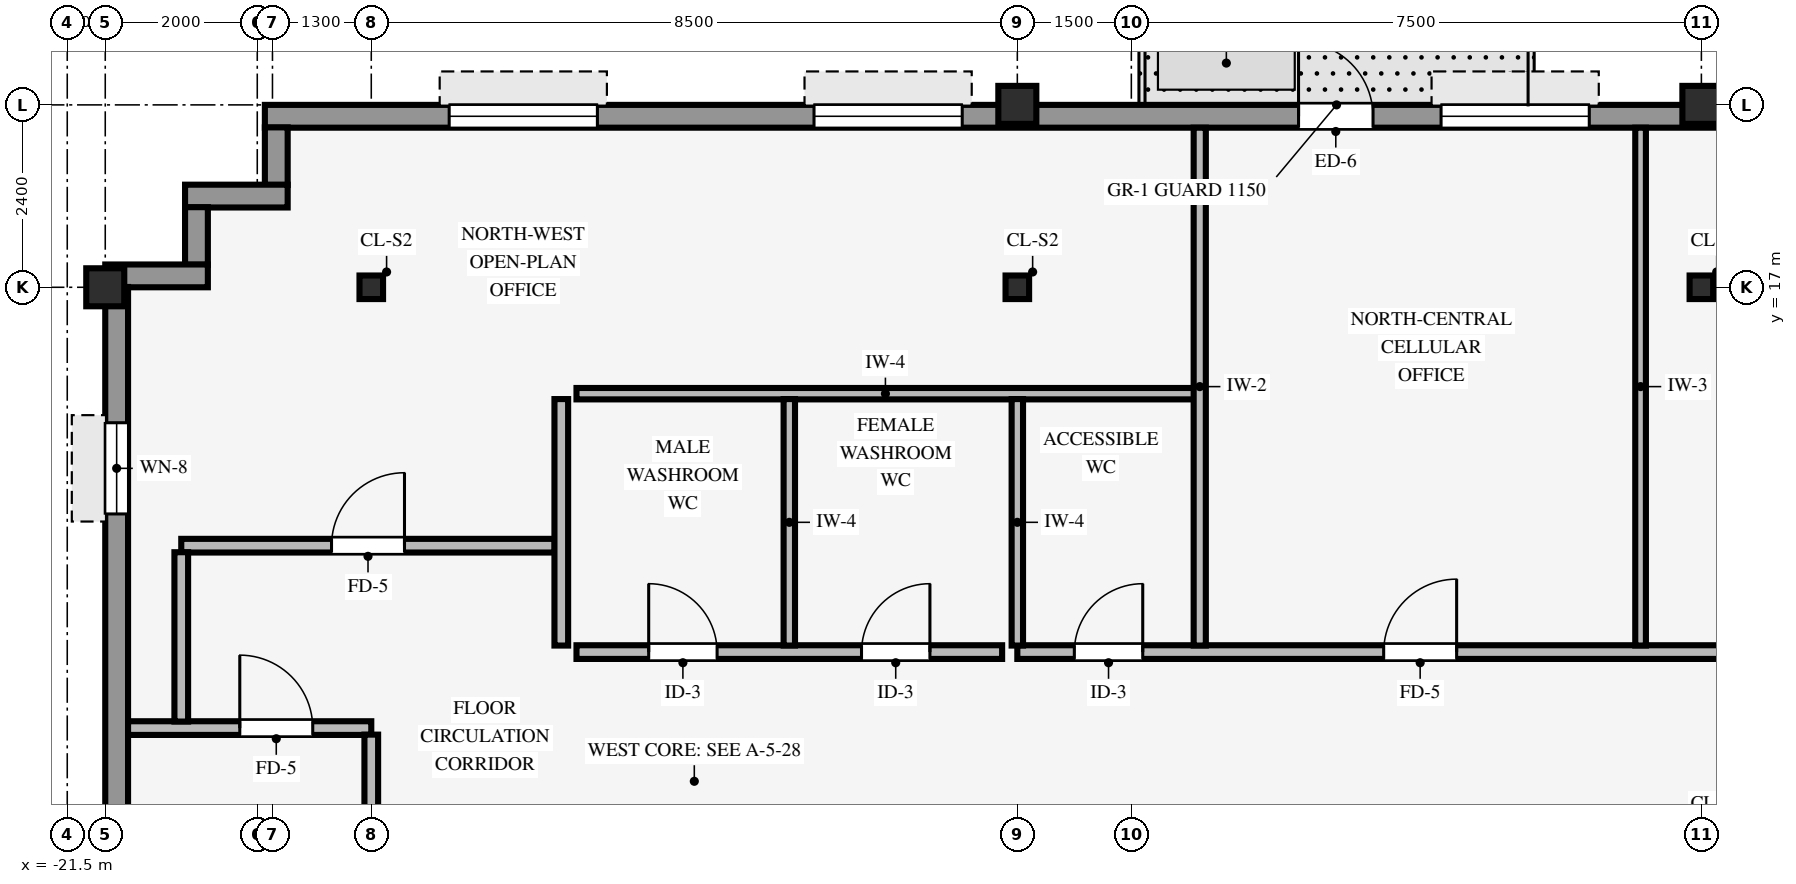
"""IFC4 building model, lengths in metres.
Left out: names, types, materials, properties, quantities, classifications, styles, units other than length and angle.
Written with IfcOpenShell. Run it as: python <this file> out.ifc"""

import sys

from ifc_helpers import new_model, si_unit, direction, frame, frame_2d, origin, origin_2d, place, context, subcontext, project, spatial, rectangle, hollow_rectangle, i_section, extrude, source, transform, mapped, element, fill, save


model = new_model("IFC4")
c1 = context("Model", 3, precision=1e-05, world=origin(), true_north=direction((0.0, 1.0)))
c2 = subcontext(c1, "Body", "Model", "MODEL_VIEW")
j1 = project(units=[si_unit("LENGTHUNIT", "METRE"), si_unit("PLANEANGLEUNIT", "RADIAN")], contexts=[c1])
p1 = place(None, origin())
s1 = spatial("IfcSite", under=j1, at=p1, CompositionType="ELEMENT")
p2 = place(p1, origin())
s2 = spatial("IfcBuilding", under=s1, at=p2, CompositionType="ELEMENT")
p3 = place(p2, frame((0.0, 0.0, 265.25)))
s3 = spatial("IfcBuildingStorey", under=s2, at=p3, CompositionType="ELEMENT", Elevation=265.25)
for number, where, z_axis, x_axis in (
    (1, (-21.0, 17.0, 0.0), (0.0, 0.0, 1.0), (1.0, 0.0, 0.0)),
    (2, (-9.0, 19.4, 0.0), (0.0, 0.0, 1.0), (1.0, 0.0, 0.0)),
    (3, (0.0, 19.4, 0.0), (0.0, 0.0, 1.0), (1.0, 0.0, 0.0)),
):
    element("IfcColumn", number, at=place(p3, frame(where, z_axis=z_axis, x_axis=x_axis)), inside=s3, PredefinedType="COLUMN", context=c2, shape_type="SweptSolid", body=[
        extrude(hollow_rectangle(XDim=0.5, YDim=0.5, WallThickness=0.032, InnerFilletRadius=0.032, OuterFilletRadius=0.064, at=origin_2d()), origin(), (0.0, 0.0, 1.0), 3.37),
    ])
for number, where, z_axis, x_axis in (
    (4, (0.0, 17.0, 0.0), (0.0, 0.0, 1.0), (1.0, 0.0, 0.0)),
    (5, (-17.5, 17.0, 0.0), (0.0, 0.0, 1.0), (1.0, 0.0, 0.0)),
    (6, (-9.0, 17.0, 0.0), (0.0, 0.0, 1.0), (1.0, 0.0, 0.0)),
):
    element("IfcColumn", number, at=place(p3, frame(where, z_axis=z_axis, x_axis=x_axis)), inside=s3, PredefinedType="COLUMN", context=c2, shape_type="SweptSolid", body=[
        extrude(i_section(OverallWidth=0.31, OverallDepth=0.31, WebThickness=0.015, FlangeThickness=0.015, FilletRadius=0.015, at=origin_2d()), origin(), (0.0, 0.0, 1.0), 3.37),
    ])
p4 = place(p3, frame((-18.9, 19.25, 0.0), z_axis=(0.0, 0.0, 1.0), x_axis=(1.0, 0.0, 0.0)))
e7 = element("IfcWall", 7, at=p4, inside=s3, PredefinedType="STANDARD", context=c2, shape_type="SweptSolid", body=[
    extrude(rectangle(XDim=35.6, YDim=0.3, at=frame_2d((17.8, 0.0))), origin(), (0.0, 0.0, 1.0), 2.705),
])
p5 = place(p4, frame((13.6, 0.0, 0.0)))
e8 = element("IfcOpeningElement", 8, at=p5, cuts=e7, PredefinedType="OPENING", context=c2, shape_type="SweptSolid", body=[
    extrude(rectangle(XDim=0.98, YDim=2.15, at=frame_2d((0.49, 1.075))), frame((0.0, 0.16, 0.0), z_axis=(0.0, -1.0, 0.0), x_axis=(1.0, 0.0, 0.0)), (0.0, 0.0, 1.0), 0.32),
])
p6 = place(p4, frame((2.425, 0.0, 0.8)))
e9 = element("IfcOpeningElement", 9, at=p6, cuts=e7, PredefinedType="OPENING", context=c2, shape_type="SweptSolid", body=[
    extrude(rectangle(XDim=1.95, YDim=1.48, at=frame_2d((0.975, 0.74))), frame((0.0, 0.16, 0.0), z_axis=(0.0, -1.0, 0.0), x_axis=(1.0, 0.0, 0.0)), (0.0, 0.0, 1.0), 0.32),
])
p7 = place(p4, frame((7.225, 0.0, 0.8)))
e10 = element("IfcOpeningElement", 10, at=p7, cuts=e7, PredefinedType="OPENING", context=c2, shape_type="SweptSolid", body=[
    extrude(rectangle(XDim=1.95, YDim=1.48, at=frame_2d((0.975, 0.74))), frame((0.0, 0.16, 0.0), z_axis=(0.0, -1.0, 0.0), x_axis=(1.0, 0.0, 0.0)), (0.0, 0.0, 1.0), 0.32),
])
p8 = place(p4, frame((15.475, 0.0, 0.8)))
e11 = element("IfcOpeningElement", 11, at=p8, cuts=e7, PredefinedType="OPENING", context=c2, shape_type="SweptSolid", body=[
    extrude(rectangle(XDim=1.95, YDim=1.48, at=frame_2d((0.975, 0.74))), frame((0.0, 0.16, 0.0), z_axis=(0.0, -1.0, 0.0), x_axis=(1.0, 0.0, 0.0)), (0.0, 0.0, 1.0), 0.32),
])
p9 = place(p4, frame((21.625, 0.0, 0.8)))
e12 = element("IfcOpeningElement", 12, at=p9, cuts=e7, PredefinedType="OPENING", context=c2, shape_type="SweptSolid", body=[
    extrude(rectangle(XDim=1.95, YDim=1.48, at=frame_2d((0.975, 0.74))), frame((0.0, 0.16, 0.0), z_axis=(0.0, -1.0, 0.0), x_axis=(1.0, 0.0, 0.0)), (0.0, 0.0, 1.0), 0.32),
])
p10 = place(p4, frame((32.575, 0.0, 0.8)))
e13 = element("IfcOpeningElement", 13, at=p10, cuts=e7, PredefinedType="OPENING", context=c2, shape_type="SweptSolid", body=[
    extrude(rectangle(XDim=1.95, YDim=1.48, at=frame_2d((0.975, 0.74))), frame((0.0, 0.16, 0.0), z_axis=(0.0, -1.0, 0.0), x_axis=(1.0, 0.0, 0.0)), (0.0, 0.0, 1.0), 0.32),
])
p11 = place(p3, frame((-18.75, 18.346, 0.0), z_axis=(0.0, 0.0, 1.0), x_axis=(0.0, 1.0, 0.0)))
e14 = element("IfcWall", 14, at=p11, inside=s3, PredefinedType="STANDARD", context=c2, shape_type="SweptSolid", body=[
    extrude(rectangle(XDim=0.758, YDim=0.3, at=frame_2d((0.379, 0.0))), origin(), (0.0, 0.0, 1.0), 2.892),
])
p12 = place(p3, frame((-19.95, 18.2, 0.0), z_axis=(0.0, 0.0, 1.0), x_axis=(1.0, 0.0, 0.0)))
e15 = element("IfcWall", 15, at=p12, inside=s3, PredefinedType="STANDARD", context=c2, shape_type="SweptSolid", body=[
    extrude(rectangle(XDim=1.35, YDim=0.3, at=frame_2d((0.675, 0.0))), origin(), (0.0, 0.0, 1.0), 2.892),
])
p13 = place(p3, frame((-19.8, 17.296, 0.0), z_axis=(0.0, 0.0, 1.0), x_axis=(0.0, 1.0, 0.0)))
e16 = element("IfcWall", 16, at=p13, inside=s3, PredefinedType="STANDARD", context=c2, shape_type="SweptSolid", body=[
    extrude(rectangle(XDim=0.758, YDim=0.3, at=frame_2d((0.379, 0.0))), origin(), (0.0, 0.0, 1.0), 2.892),
])
p14 = place(p3, frame((-21.0, 17.15, 0.0), z_axis=(0.0, 0.0, 1.0), x_axis=(1.0, 0.0, 0.0)))
e17 = element("IfcWall", 17, at=p14, inside=s3, PredefinedType="STANDARD", context=c2, shape_type="SweptSolid", body=[
    extrude(rectangle(XDim=1.35, YDim=0.3, at=frame_2d((0.675, 0.0))), origin(), (0.0, 0.0, 1.0), 2.892),
])
p15 = place(p3, frame((-20.85, -17.004, 0.0), z_axis=(0.0, 0.0, 1.0), x_axis=(0.0, 1.0, 0.0)))
e18 = element("IfcWall", 18, at=p15, inside=s3, PredefinedType="STANDARD", context=c2, shape_type="SweptSolid", body=[
    extrude(rectangle(XDim=34.008, YDim=0.3, at=frame_2d((17.004, 0.0))), origin(), (0.0, 0.0, 1.0), 2.705),
])
p16 = place(p15, frame((1.786, 0.0, 0.8)))
e19 = element("IfcOpeningElement", 19, at=p16, cuts=e18, PredefinedType="OPENING", context=c2, shape_type="SweptSolid", body=[
    extrude(rectangle(XDim=1.2, YDim=1.48, at=frame_2d((0.6, 0.74))), frame((0.0, 0.16, 0.0), z_axis=(0.0, -1.0, 0.0), x_axis=(1.0, 0.0, 0.0)), (0.0, 0.0, 1.0), 0.32),
])
p17 = place(p15, frame((8.159, 0.0, 0.8)))
e20 = element("IfcOpeningElement", 20, at=p17, cuts=e18, PredefinedType="OPENING", context=c2, shape_type="SweptSolid", body=[
    extrude(rectangle(XDim=1.2, YDim=1.48, at=frame_2d((0.6, 0.74))), frame((0.0, 0.16, 0.0), z_axis=(0.0, -1.0, 0.0), x_axis=(1.0, 0.0, 0.0)), (0.0, 0.0, 1.0), 0.32),
])
p18 = place(p15, frame((11.831, 0.0, 0.8)))
e21 = element("IfcOpeningElement", 21, at=p18, cuts=e18, PredefinedType="OPENING", context=c2, shape_type="SweptSolid", body=[
    extrude(rectangle(XDim=1.2, YDim=1.48, at=frame_2d((0.6, 0.74))), frame((0.0, 0.16, 0.0), z_axis=(0.0, -1.0, 0.0), x_axis=(1.0, 0.0, 0.0)), (0.0, 0.0, 1.0), 0.32),
])
p19 = place(p15, frame((17.754, 0.0, 0.8)))
e22 = element("IfcOpeningElement", 22, at=p19, cuts=e18, PredefinedType="OPENING", context=c2, shape_type="SweptSolid", body=[
    extrude(rectangle(XDim=1.2, YDim=1.48, at=frame_2d((0.6, 0.74))), frame((0.0, 0.16, 0.0), z_axis=(0.0, -1.0, 0.0), x_axis=(1.0, 0.0, 0.0)), (0.0, 0.0, 1.0), 0.32),
])
p20 = place(p15, frame((20.977, 0.0, 0.8)))
e23 = element("IfcOpeningElement", 23, at=p20, cuts=e18, PredefinedType="OPENING", context=c2, shape_type="SweptSolid", body=[
    extrude(rectangle(XDim=1.2, YDim=1.48, at=frame_2d((0.6, 0.74))), frame((0.0, 0.16, 0.0), z_axis=(0.0, -1.0, 0.0), x_axis=(1.0, 0.0, 0.0)), (0.0, 0.0, 1.0), 0.32),
])
p21 = place(p15, frame((24.649, 0.0, 0.8)))
e24 = element("IfcOpeningElement", 24, at=p21, cuts=e18, PredefinedType="OPENING", context=c2, shape_type="SweptSolid", body=[
    extrude(rectangle(XDim=1.2, YDim=1.48, at=frame_2d((0.6, 0.74))), frame((0.0, 0.16, 0.0), z_axis=(0.0, -1.0, 0.0), x_axis=(1.0, 0.0, 0.0)), (0.0, 0.0, 1.0), 0.32),
])
p22 = place(p15, frame((31.022, 0.0, 0.8)))
e25 = element("IfcOpeningElement", 25, at=p22, cuts=e18, PredefinedType="OPENING", context=c2, shape_type="SweptSolid", body=[
    extrude(rectangle(XDim=1.2, YDim=1.48, at=frame_2d((0.6, 0.74))), frame((0.0, 0.16, 0.0), z_axis=(0.0, -1.0, 0.0), x_axis=(1.0, 0.0, 0.0)), (0.0, 0.0, 1.0), 0.32),
])
p23 = place(p3, frame((-20.7, 11.2, 0.0), z_axis=(0.0, 0.0, 1.0), x_axis=(1.0, 0.0, 0.0)))
e26 = element("IfcWall", 26, at=p23, inside=s3, PredefinedType="PARTITIONING", context=c2, shape_type="SweptSolid", body=[
    extrude(rectangle(XDim=3.2, YDim=0.18, at=frame_2d((1.6, 0.0))), origin(), (0.0, 0.0, 1.0), 3.36),
])
p24 = place(p23, frame((1.47, 0.0, 0.0)))
e27 = element("IfcOpeningElement", 27, at=p24, cuts=e26, PredefinedType="OPENING", context=c2, shape_type="SweptSolid", body=[
    extrude(rectangle(XDim=0.96, YDim=2.1, at=frame_2d((0.48, 1.05))), frame((0.0, 0.1, 0.0), z_axis=(0.0, -1.0, 0.0), x_axis=(1.0, 0.0, 0.0)), (0.0, 0.0, 1.0), 0.2),
])
p25 = place(p3, frame((-14.8, 12.2, 0.0), z_axis=(0.0, 0.0, 1.0), x_axis=(1.0, 0.0, 0.0)))
e28 = element("IfcWall", 28, at=p25, inside=s3, PredefinedType="PARTITIONING", context=c2, shape_type="SweptSolid", body=[
    extrude(rectangle(XDim=5.6, YDim=0.18, at=frame_2d((2.8, 0.0))), origin(), (0.0, 0.0, 1.0), 3.36),
])
p26 = place(p25, frame((0.95, 0.0, 0.0)))
e29 = element("IfcOpeningElement", 29, at=p26, cuts=e28, PredefinedType="OPENING", context=c2, shape_type="SweptSolid", body=[
    extrude(rectangle(XDim=0.9, YDim=2.1, at=frame_2d((0.45, 1.05))), frame((0.0, 0.1, 0.0), z_axis=(0.0, -1.0, 0.0), x_axis=(1.0, 0.0, 0.0)), (0.0, 0.0, 1.0), 0.2),
])
p27 = place(p25, frame((3.75, 0.0, 0.0)))
e30 = element("IfcOpeningElement", 30, at=p27, cuts=e28, PredefinedType="OPENING", context=c2, shape_type="SweptSolid", body=[
    extrude(rectangle(XDim=0.9, YDim=2.1, at=frame_2d((0.45, 1.05))), frame((0.0, 0.1, 0.0), z_axis=(0.0, -1.0, 0.0), x_axis=(1.0, 0.0, 0.0)), (0.0, 0.0, 1.0), 0.2),
])
p28 = place(p3, frame((-9.0, 12.2, 0.0), z_axis=(0.0, 0.0, 1.0), x_axis=(1.0, 0.0, 0.0)))
e31 = element("IfcWall", 31, at=p28, inside=s3, PredefinedType="PARTITIONING", context=c2, shape_type="SweptSolid", body=[
    extrude(rectangle(XDim=24.8, YDim=0.18, at=frame_2d((12.4, 0.0))), origin(), (0.0, 0.0, 1.0), 3.36),
])
p29 = place(p28, frame((11.42, 0.0, 0.0)))
e32 = element("IfcOpeningElement", 32, at=p29, cuts=e31, PredefinedType="OPENING", context=c2, shape_type="SweptSolid", body=[
    extrude(rectangle(XDim=0.96, YDim=2.1, at=frame_2d((0.48, 1.05))), frame((0.0, 0.1, 0.0), z_axis=(0.0, -1.0, 0.0), x_axis=(1.0, 0.0, 0.0)), (0.0, 0.0, 1.0), 0.2),
])
p30 = place(p28, frame((4.82, 0.0, 0.0)))
e33 = element("IfcOpeningElement", 33, at=p30, cuts=e31, PredefinedType="OPENING", context=c2, shape_type="SweptSolid", body=[
    extrude(rectangle(XDim=0.96, YDim=2.1, at=frame_2d((0.48, 1.05))), frame((0.0, 0.1, 0.0), z_axis=(0.0, -1.0, 0.0), x_axis=(1.0, 0.0, 0.0)), (0.0, 0.0, 1.0), 0.2),
])
p31 = place(p28, frame((19.52, 0.0, 0.0)))
e34 = element("IfcOpeningElement", 34, at=p31, cuts=e31, PredefinedType="OPENING", context=c2, shape_type="SweptSolid", body=[
    extrude(rectangle(XDim=0.96, YDim=2.1, at=frame_2d((0.48, 1.05))), frame((0.0, 0.1, 0.0), z_axis=(0.0, -1.0, 0.0), x_axis=(1.0, 0.0, 0.0)), (0.0, 0.0, 1.0), 0.2),
])
p32 = place(p28, frame((22.92, 0.0, 0.0)))
e35 = element("IfcOpeningElement", 35, at=p32, cuts=e31, PredefinedType="OPENING", context=c2, shape_type="SweptSolid", body=[
    extrude(rectangle(XDim=0.96, YDim=2.1, at=frame_2d((0.48, 1.05))), frame((0.0, 0.1, 0.0), z_axis=(0.0, -1.0, 0.0), x_axis=(1.0, 0.0, 0.0)), (0.0, 0.0, 1.0), 0.2),
])
p33 = place(p28, frame((0.75, 0.0, 0.0)))
e36 = element("IfcOpeningElement", 36, at=p33, cuts=e31, PredefinedType="OPENING", context=c2, shape_type="SweptSolid", body=[
    extrude(rectangle(XDim=0.9, YDim=2.1, at=frame_2d((0.45, 1.05))), frame((0.0, 0.1, 0.0), z_axis=(0.0, -1.0, 0.0), x_axis=(1.0, 0.0, 0.0)), (0.0, 0.0, 1.0), 0.2),
])
p34 = place(p3, frame((-20.0, 13.6, 0.0), z_axis=(0.0, 0.0, 1.0), x_axis=(1.0, 0.0, 0.0)))
e37 = element("IfcWall", 37, at=p34, inside=s3, PredefinedType="PARTITIONING", context=c2, shape_type="SweptSolid", body=[
    extrude(rectangle(XDim=4.914, YDim=0.18, at=frame_2d((2.457, 0.0))), origin(), (0.0, 0.0, 1.0), 3.038),
])
p35 = place(p34, frame((1.977, 0.0, 0.0)))
e38 = element("IfcOpeningElement", 38, at=p35, cuts=e37, PredefinedType="OPENING", context=c2, shape_type="SweptSolid", body=[
    extrude(rectangle(XDim=0.96, YDim=2.1, at=frame_2d((0.48, 1.05))), frame((0.0, 0.1, 0.0), z_axis=(0.0, -1.0, 0.0), x_axis=(1.0, 0.0, 0.0)), (0.0, 0.0, 1.0), 0.2),
])
p36 = place(p3, frame((-14.8, 15.6, 0.0), z_axis=(0.0, 0.0, 1.0), x_axis=(1.0, 0.0, 0.0)))
e39 = element("IfcWall", 39, at=p36, inside=s3, PredefinedType="PARTITIONING", context=c2, shape_type="SweptSolid", body=[
    extrude(rectangle(XDim=8.129, YDim=0.15, at=frame_2d((4.064, 0.0))), origin(), (0.0, 0.0, 1.0), 3.36),
])
p37 = place(p3, frame((-20.0, 11.286, 0.0), z_axis=(0.0, 0.0, 1.0), x_axis=(0.0, 1.0, 0.0)))
e40 = element("IfcWall", 40, at=p37, inside=s3, PredefinedType="PARTITIONING", context=c2, shape_type="SweptSolid", body=[
    extrude(rectangle(XDim=2.228, YDim=0.18, at=frame_2d((1.114, 0.0))), origin(), (0.0, 0.0, 1.0), 3.36),
])
p38 = place(p3, frame((-17.5, 9.996, 0.0), z_axis=(0.0, 0.0, 1.0), x_axis=(0.0, 1.0, 0.0)))
e41 = element("IfcWall", 41, at=p38, inside=s3, PredefinedType="PARTITIONING", context=c2, shape_type="SweptSolid", body=[
    extrude(rectangle(XDim=1.118, YDim=0.18, at=frame_2d((0.559, 0.0))), origin(), (0.0, 0.0, 1.0), 2.892),
])
p39 = place(p3, frame((-15.0, 12.286, 0.0), z_axis=(0.0, 0.0, 1.0), x_axis=(0.0, 1.0, 0.0)))
e42 = element("IfcWall", 42, at=p39, inside=s3, PredefinedType="PARTITIONING", context=c2, shape_type="SweptSolid", body=[
    extrude(rectangle(XDim=3.243, YDim=0.18, at=frame_2d((1.622, 0.0))), origin(), (0.0, 0.0, 1.0), 3.36),
])
p40 = place(p3, frame((-12.0, 12.286, 0.0), z_axis=(0.0, 0.0, 1.0), x_axis=(0.0, 1.0, 0.0)))
e43 = element("IfcWall", 43, at=p40, inside=s3, PredefinedType="PARTITIONING", context=c2, shape_type="SweptSolid", body=[
    extrude(rectangle(XDim=3.243, YDim=0.15, at=frame_2d((1.622, 0.0))), origin(), (0.0, 0.0, 1.0), 3.36),
])
p41 = place(p3, frame((-9.0, 12.286, 0.0), z_axis=(0.0, 0.0, 1.0), x_axis=(0.0, 1.0, 0.0)))
e44 = element("IfcWall", 44, at=p41, inside=s3, PredefinedType="PARTITIONING", context=c2, shape_type="SweptSolid", body=[
    extrude(rectangle(XDim=3.243, YDim=0.15, at=frame_2d((1.622, 0.0))), origin(), (0.0, 0.0, 1.0), 2.892),
])
p42 = place(p3, frame((-6.6, 12.286, 0.0), z_axis=(0.0, 0.0, 1.0), x_axis=(0.0, 1.0, 0.0)))
e45 = element("IfcWall", 45, at=p42, inside=s3, PredefinedType="PARTITIONING", context=c2, shape_type="SweptSolid", body=[
    extrude(rectangle(XDim=6.814, YDim=0.16, at=frame_2d((3.407, 0.0))), origin(), (0.0, 0.0, 1.0), 3.36),
])
p43 = place(p3, frame((-0.8, 12.286, 0.0), z_axis=(0.0, 0.0, 1.0), x_axis=(0.0, 1.0, 0.0)))
e46 = element("IfcWall", 46, at=p43, inside=s3, PredefinedType="PARTITIONING", context=c2, shape_type="SweptSolid", body=[
    extrude(rectangle(XDim=6.814, YDim=0.14, at=frame_2d((3.407, 0.0))), origin(), (0.0, 0.0, 1.0), 3.36),
])
m1 = source(origin(), c2, "Body", "SweptSolid", [
    extrude(rectangle(XDim=0.98, YDim=2.15, at=frame_2d((0.49, 1.075))), frame((0.0, 0.025, 0.0), z_axis=(0.0, -1.0, 0.0), x_axis=(1.0, 0.0, 0.0)), (0.0, 0.0, 1.0), 0.05),
])
p44 = place(p5, origin())
e47 = element("IfcDoor", 47, at=p44, inside=s3, OperationType="SINGLE_SWING_LEFT", PredefinedType="DOOR", context=c2, shape_type="MappedRepresentation", body=[
    mapped(m1, transform((0.0, 0.0, 0.0), scale=1.0)),
])
fill(e8, e47)
m2 = source(origin(), c2, "Body", "SweptSolid", [
    extrude(rectangle(XDim=1.95, YDim=1.48, at=frame_2d((0.975, 0.74))), frame((0.0, 0.03, 0.0), z_axis=(0.0, -1.0, 0.0), x_axis=(1.0, 0.0, 0.0)), (0.0, 0.0, 1.0), 0.06),
])
p45 = place(p6, origin())
e48 = element("IfcWindow", 48, at=p45, inside=s3, PartitioningType="SINGLE_PANEL", PredefinedType="WINDOW", context=c2, shape_type="MappedRepresentation", body=[
    mapped(m2, transform((0.0, 0.0, 0.0), scale=1.0)),
])
fill(e9, e48)
p46 = place(p7, origin())
e49 = element("IfcWindow", 49, at=p46, inside=s3, PartitioningType="SINGLE_PANEL", PredefinedType="WINDOW", context=c2, shape_type="MappedRepresentation", body=[
    mapped(m2, transform((0.0, 0.0, 0.0), scale=1.0)),
])
fill(e10, e49)
p47 = place(p8, origin())
e50 = element("IfcWindow", 50, at=p47, inside=s3, PartitioningType="SINGLE_PANEL", PredefinedType="WINDOW", context=c2, shape_type="MappedRepresentation", body=[
    mapped(m2, transform((0.0, 0.0, 0.0), scale=1.0)),
])
fill(e11, e50)
m3 = source(origin(), c2, "Body", "SweptSolid", [
    extrude(rectangle(XDim=1.2, YDim=1.48, at=frame_2d((0.6, 0.74))), frame((0.0, 0.03, 0.0), z_axis=(0.0, -1.0, 0.0), x_axis=(1.0, 0.0, 0.0)), (0.0, 0.0, 1.0), 0.06),
])
p48 = place(p22, origin())
e51 = element("IfcWindow", 51, at=p48, inside=s3, PartitioningType="SINGLE_PANEL", PredefinedType="WINDOW", context=c2, shape_type="MappedRepresentation", body=[
    mapped(m3, transform((0.0, 0.0, 0.0), scale=1.0)),
])
fill(e25, e51)
m4 = source(origin(), c2, "Body", "SweptSolid", [
    extrude(rectangle(XDim=0.96, YDim=2.1, at=frame_2d((0.48, 1.05))), frame((0.0, 0.025, 0.0), z_axis=(0.0, -1.0, 0.0), x_axis=(1.0, 0.0, 0.0)), (0.0, 0.0, 1.0), 0.05),
])
p49 = place(p30, origin())
e52 = element("IfcDoor", 52, at=p49, inside=s3, OperationType="SINGLE_SWING_RIGHT", PredefinedType="DOOR", context=c2, shape_type="MappedRepresentation", body=[
    mapped(m4, transform((0.0, 0.0, 0.0), scale=1.0)),
])
fill(e33, e52)
p50 = place(p35, origin())
e53 = element("IfcDoor", 53, at=p50, inside=s3, OperationType="SINGLE_SWING_RIGHT", PredefinedType="DOOR", context=c2, shape_type="MappedRepresentation", body=[
    mapped(m4, transform((0.0, 0.0, 0.0), scale=1.0)),
])
fill(e38, e53)
m5 = source(origin(), c2, "Body", "SweptSolid", [
    extrude(rectangle(XDim=0.9, YDim=2.1, at=frame_2d((0.45, 1.05))), frame((0.0, 0.025, 0.0), z_axis=(0.0, -1.0, 0.0), x_axis=(1.0, 0.0, 0.0)), (0.0, 0.0, 1.0), 0.05),
])
p51 = place(p26, origin())
e54 = element("IfcDoor", 54, at=p51, inside=s3, OperationType="SINGLE_SWING_LEFT", PredefinedType="DOOR", context=c2, shape_type="MappedRepresentation", body=[
    mapped(m5, transform((0.0, 0.0, 0.0), scale=1.0)),
])
fill(e29, e54)
p52 = place(p27, origin())
e55 = element("IfcDoor", 55, at=p52, inside=s3, OperationType="SINGLE_SWING_RIGHT", PredefinedType="DOOR", context=c2, shape_type="MappedRepresentation", body=[
    mapped(m5, transform((0.0, 0.0, 0.0), scale=1.0)),
])
fill(e30, e55)
p53 = place(p24, origin())
e56 = element("IfcDoor", 56, at=p53, inside=s3, OperationType="SINGLE_SWING_LEFT", PredefinedType="DOOR", context=c2, shape_type="MappedRepresentation", body=[
    mapped(m4, transform((0.0, 0.0, 0.0), scale=1.0)),
])
fill(e27, e56)
p54 = place(p33, origin())
e57 = element("IfcDoor", 57, at=p54, inside=s3, OperationType="SINGLE_SWING_RIGHT", PredefinedType="DOOR", context=c2, shape_type="MappedRepresentation", body=[
    mapped(m5, transform((0.0, 0.0, 0.0), scale=1.0)),
])
fill(e36, e57)
save(model, sys.argv[1])
